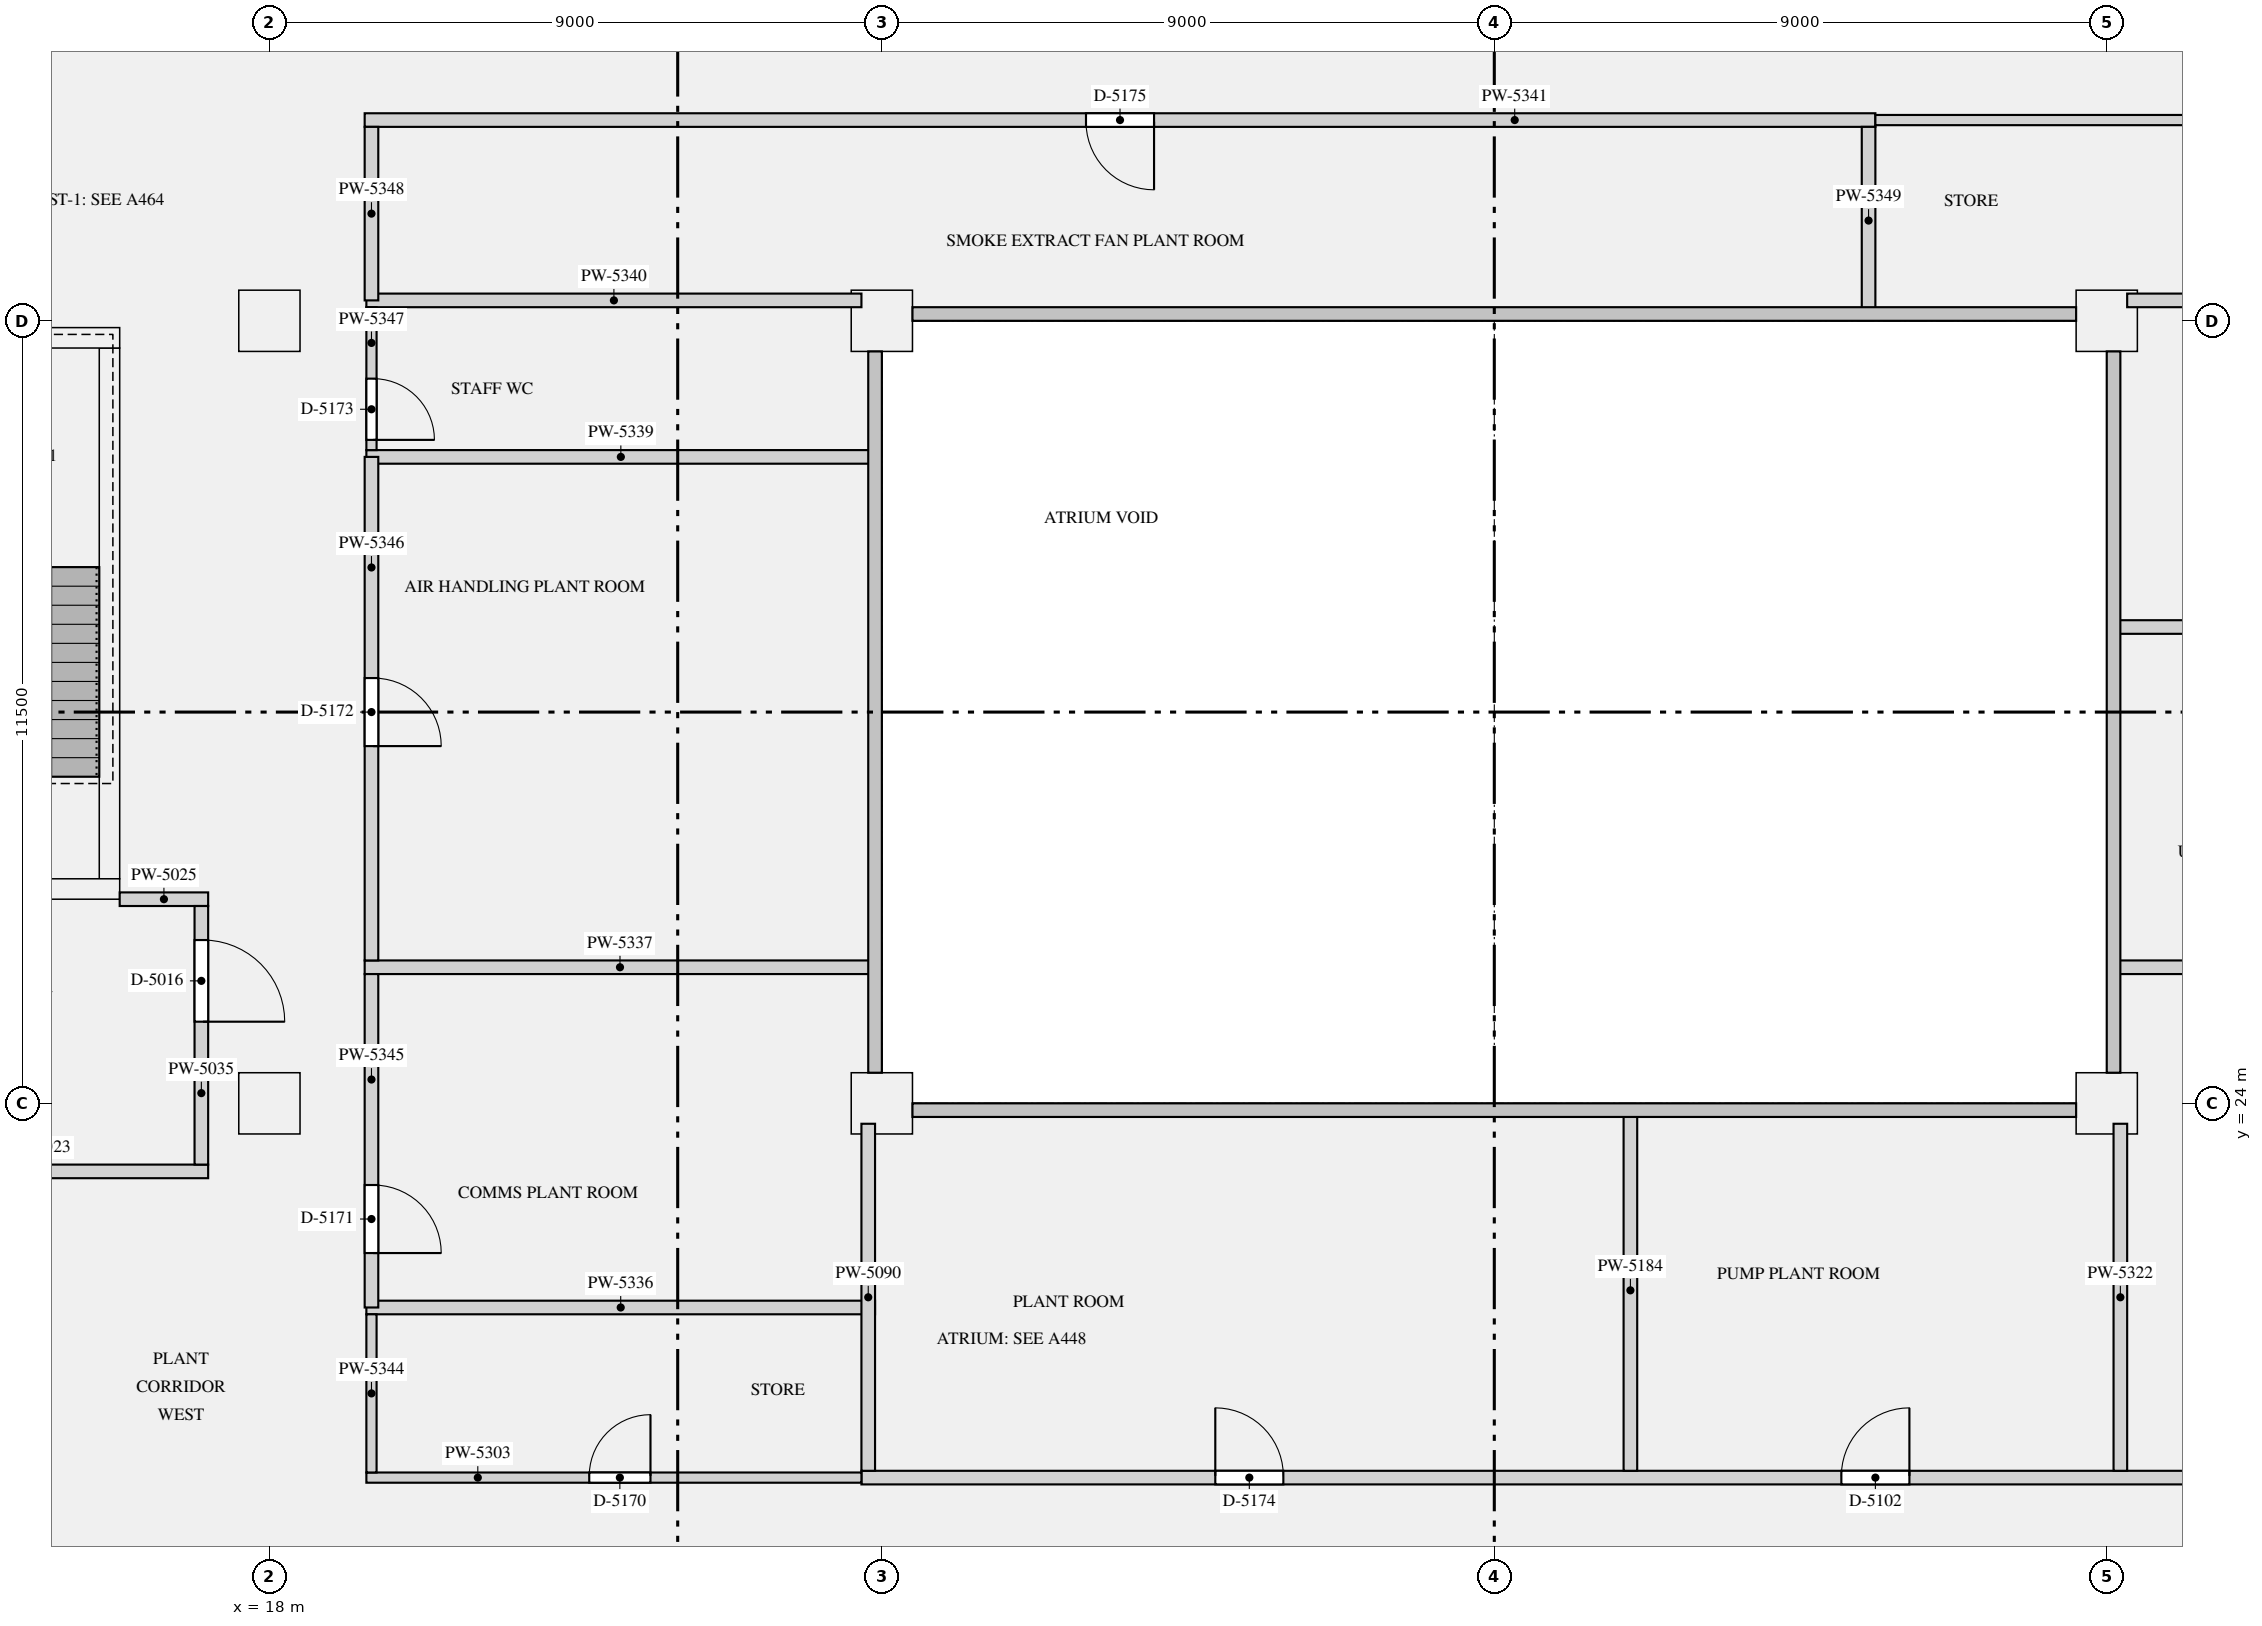
"""IFC4 building model, lengths in metres.
Left out: names, types, materials, properties, quantities, classifications, styles, units other than length and angle.
Written with IfcOpenShell. Run it as: python <this file> out.ifc"""

import sys

from ifc_helpers import new_model, si_unit, direction, frame, frame_2d, origin, origin_2d, place, context, subcontext, project, spatial, rectangle, extrude, element, fill, save


model = new_model("IFC4")
c1 = context("Model", 3, precision=1e-05, world=origin(), true_north=direction((0.0, 1.0)))
c2 = subcontext(c1, "Body", "Model", "MODEL_VIEW")
j1 = project(units=[si_unit("LENGTHUNIT", "METRE"), si_unit("PLANEANGLEUNIT", "RADIAN")], contexts=[c1])
p1 = place(None, origin())
s1 = spatial("IfcSite", under=j1, at=p1, CompositionType="ELEMENT")
p2 = place(p1, origin())
s2 = spatial("IfcBuilding", under=s1, at=p2, CompositionType="ELEMENT")
p3 = place(p2, frame((0.0, 0.0, 240.0)))
s3 = spatial("IfcBuildingStorey", under=s2, at=p3, CompositionType="ELEMENT", Elevation=240.0)
for number, where, z_axis, x_axis in (
    (1, (18.0, 24.0, 0.0), (0.0, 0.0, 1.0), (1.0, 0.0, 0.0)),
    (2, (27.0, 24.0, 0.0), (0.0, 0.0, 1.0), (1.0, 0.0, 0.0)),
    (3, (45.0, 24.0, 0.0), (0.0, 0.0, 1.0), (1.0, 0.0, 0.0)),
    (4, (18.0, 35.5, 0.0), (0.0, 0.0, 1.0), (1.0, 0.0, 0.0)),
    (5, (27.0, 35.5, 0.0), (0.0, 0.0, 1.0), (1.0, 0.0, 0.0)),
    (6, (45.0, 35.5, 0.0), (0.0, 0.0, 1.0), (1.0, 0.0, 0.0)),
):
    element("IfcColumn", number, at=place(p3, frame(where, z_axis=z_axis, x_axis=x_axis)), inside=s3, PredefinedType="COLUMN", context=c2, shape_type="SweptSolid", body=[
        extrude(rectangle(XDim=0.9, YDim=0.9, at=origin_2d()), origin(), (0.0, 0.0, 1.0), 4.2),
    ])
p4 = place(p3, frame((12.2, 27.15, 0.0), z_axis=(0.0, 0.0, 1.0), x_axis=(1.0, 0.0, 0.0)))
e7 = element("IfcWall", 7, at=p4, inside=s3, PredefinedType="SHEAR", context=c2, shape_type="SweptSolid", body=[
    extrude(rectangle(XDim=3.6, YDim=0.3, at=frame_2d((1.8, 0.0))), origin(), (0.0, 0.0, 1.0), 4.2),
])
p5 = place(p4, frame((1.25, 0.0, 0.0)))
e8 = element("IfcOpeningElement", 8, at=p5, cuts=e7, PredefinedType="OPENING", context=c2, shape_type="SweptSolid", body=[
    extrude(rectangle(XDim=1.1, YDim=2.1, at=frame_2d((0.55, 1.05))), frame((0.0, 0.16, 0.0), z_axis=(0.0, -1.0, 0.0), x_axis=(1.0, 0.0, 0.0)), (0.0, 0.0, 1.0), 0.32),
])
p6 = place(p3, frame((12.2, 35.25, 0.0), z_axis=(0.0, 0.0, 1.0), x_axis=(1.0, 0.0, 0.0)))
e9 = element("IfcWall", 9, at=p6, inside=s3, PredefinedType="SHEAR", context=c2, shape_type="SweptSolid", body=[
    extrude(rectangle(XDim=3.6, YDim=0.3, at=frame_2d((1.8, 0.0))), origin(), (0.0, 0.0, 1.0), 4.2),
])
p7 = place(p3, frame((15.65, 27.3, 0.0), z_axis=(0.0, 0.0, 1.0), x_axis=(0.0, 1.0, 0.0)))
e10 = element("IfcWall", 10, at=p7, inside=s3, PredefinedType="SHEAR", context=c2, shape_type="SweptSolid", body=[
    extrude(rectangle(XDim=7.8, YDim=0.3, at=frame_2d((3.9, 0.0))), origin(), (0.0, 0.0, 1.0), 4.2),
])
p8 = place(p3, frame((12.1, 23.0, 0.0), z_axis=(0.0, 0.0, 1.0), x_axis=(1.0, 0.0, 0.0)))
e11 = element("IfcWall", 11, at=p8, inside=s3, PredefinedType="PARTITIONING", context=c2, shape_type="SweptSolid", body=[
    extrude(rectangle(XDim=5.0, YDim=0.2, at=frame_2d((2.5, 0.0))), origin(), (0.0, 0.0, 1.0), 3.85),
])
p9 = place(p3, frame((15.8, 27.0, 0.0), z_axis=(0.0, 0.0, 1.0), x_axis=(1.0, 0.0, 0.0)))
e12 = element("IfcWall", 12, at=p9, inside=s3, PredefinedType="PARTITIONING", context=c2, shape_type="SweptSolid", body=[
    extrude(rectangle(XDim=1.3, YDim=0.2, at=frame_2d((0.65, 0.0))), origin(), (0.0, 0.0, 1.0), 3.85),
])
p10 = place(p3, frame((17.0, 23.1, 0.0), z_axis=(0.0, 0.0, 1.0), x_axis=(0.0, 1.0, 0.0)))
e13 = element("IfcWall", 13, at=p10, inside=s3, PredefinedType="PARTITIONING", context=c2, shape_type="SweptSolid", body=[
    extrude(rectangle(XDim=3.8, YDim=0.2, at=frame_2d((1.9, 0.0))), origin(), (0.0, 0.0, 1.0), 3.85),
])
p11 = place(p10, frame((2.1, 0.0, 0.0)))
e14 = element("IfcOpeningElement", 14, at=p11, cuts=e13, PredefinedType="OPENING", context=c2, shape_type="SweptSolid", body=[
    extrude(rectangle(XDim=1.2, YDim=2.1, at=frame_2d((0.6, 1.05))), frame((0.0, 0.11, 0.0), z_axis=(0.0, -1.0, 0.0), x_axis=(1.0, 0.0, 0.0)), (0.0, 0.0, 1.0), 0.22),
])
p12 = place(p3, frame((26.7, 18.5, 0.0), z_axis=(0.0, 0.0, 1.0), x_axis=(1.0, 0.0, 0.0)))
e15 = element("IfcWall", 15, at=p12, inside=s3, PredefinedType="PARTITIONING", context=c2, shape_type="SweptSolid", body=[
    extrude(rectangle(XDim=25.9, YDim=0.2, at=frame_2d((12.95, 0.0))), origin(), (0.0, 0.0, 1.0), 3.85),
])
p13 = place(p12, frame((5.2, 0.0, 0.0)))
e16 = element("IfcOpeningElement", 16, at=p13, cuts=e15, PredefinedType="OPENING", context=c2, shape_type="SweptSolid", body=[
    extrude(rectangle(XDim=1.0, YDim=2.1, at=frame_2d((0.5, 1.05))), frame((0.0, 0.11, 0.0), z_axis=(0.0, -1.0, 0.0), x_axis=(1.0, 0.0, 0.0)), (0.0, 0.0, 1.0), 0.22),
])
p14 = place(p12, frame((14.4, 0.0, 0.0)))
e17 = element("IfcOpeningElement", 17, at=p14, cuts=e15, PredefinedType="OPENING", context=c2, shape_type="SweptSolid", body=[
    extrude(rectangle(XDim=1.0, YDim=2.1, at=frame_2d((0.5, 1.05))), frame((0.0, 0.11, 0.0), z_axis=(0.0, -1.0, 0.0), x_axis=(1.0, 0.0, 0.0)), (0.0, 0.0, 1.0), 0.22),
])
p15 = place(p3, frame((19.425, 18.5, 0.0), z_axis=(0.0, 0.0, 1.0), x_axis=(1.0, 0.0, 0.0)))
e18 = element("IfcWall", 18, at=p15, inside=s3, PredefinedType="PARTITIONING", context=c2, shape_type="SweptSolid", body=[
    extrude(rectangle(XDim=7.275, YDim=0.15, at=frame_2d((3.637, 0.0))), origin(), (0.0, 0.0, 1.0), 3.85),
])
p16 = place(p15, frame((3.275, 0.0, 0.0)))
e19 = element("IfcOpeningElement", 19, at=p16, cuts=e18, PredefinedType="OPENING", context=c2, shape_type="SweptSolid", body=[
    extrude(rectangle(XDim=0.9, YDim=2.1, at=frame_2d((0.45, 1.05))), frame((0.0, 0.085, 0.0), z_axis=(0.0, -1.0, 0.0), x_axis=(1.0, 0.0, 0.0)), (0.0, 0.0, 1.0), 0.17),
])
p17 = place(p3, frame((19.425, 21.0, 0.0), z_axis=(0.0, 0.0, 1.0), x_axis=(1.0, 0.0, 0.0)))
e20 = element("IfcWall", 20, at=p17, inside=s3, PredefinedType="PARTITIONING", context=c2, shape_type="SweptSolid", body=[
    extrude(rectangle(XDim=7.475, YDim=0.2, at=frame_2d((3.737, 0.0))), origin(), (0.0, 0.0, 1.0), 3.85),
])
for number, where, z_axis, x_axis in (
    (21, (19.4, 26.0, 0.0), (0.0, 0.0, 1.0), (1.0, 0.0, 0.0)),
    (22, (45.096, 26.0, 0.0), (0.0, 0.0, 1.0), (1.0, 0.0, 0.0)),
    (23, (45.096, 31.0, 0.0), (0.0, 0.0, 1.0), (1.0, 0.0, 0.0)),
):
    element("IfcWall", number, at=place(p3, frame(where, z_axis=z_axis, x_axis=x_axis)), inside=s3, PredefinedType="PARTITIONING", context=c2, shape_type="SweptSolid", body=[
        extrude(rectangle(XDim=7.504, YDim=0.2, at=frame_2d((3.752, 0.0))), origin(), (0.0, 0.0, 1.0), 3.85),
    ])
p18 = place(p3, frame((19.425, 33.5, 0.0), z_axis=(0.0, 0.0, 1.0), x_axis=(1.0, 0.0, 0.0)))
e24 = element("IfcWall", 24, at=p18, inside=s3, PredefinedType="PARTITIONING", context=c2, shape_type="SweptSolid", body=[
    extrude(rectangle(XDim=7.479, YDim=0.2, at=frame_2d((3.74, 0.0))), origin(), (0.0, 0.0, 1.0), 3.85),
])
for number, where, z_axis, x_axis in (
    (25, (19.425, 35.8, 0.0), (0.0, 0.0, 1.0), (1.0, 0.0, 0.0)),
    (26, (45.3, 35.8, 0.0), (0.0, 0.0, 1.0), (1.0, 0.0, 0.0)),
):
    element("IfcWall", number, at=place(p3, frame(where, z_axis=z_axis, x_axis=x_axis)), inside=s3, PredefinedType="PARTITIONING", context=c2, shape_type="SweptSolid", body=[
        extrude(rectangle(XDim=7.275, YDim=0.2, at=frame_2d((3.637, 0.0))), origin(), (0.0, 0.0, 1.0), 3.85),
    ])
p19 = place(p3, frame((19.4, 38.45, 0.0), z_axis=(0.0, 0.0, 1.0), x_axis=(1.0, 0.0, 0.0)))
e27 = element("IfcWall", 27, at=p19, inside=s3, PredefinedType="PARTITIONING", context=c2, shape_type="SweptSolid", body=[
    extrude(rectangle(XDim=22.2, YDim=0.2, at=frame_2d((11.1, 0.0))), origin(), (0.0, 0.0, 1.0), 3.85),
])
p20 = place(p19, frame((10.6, 0.0, 0.0)))
e28 = element("IfcOpeningElement", 28, at=p20, cuts=e27, PredefinedType="OPENING", context=c2, shape_type="SweptSolid", body=[
    extrude(rectangle(XDim=1.0, YDim=2.1, at=frame_2d((0.5, 1.05))), frame((0.0, 0.11, 0.0), z_axis=(0.0, -1.0, 0.0), x_axis=(1.0, 0.0, 0.0)), (0.0, 0.0, 1.0), 0.22),
])
p21 = place(p3, frame((41.6, 38.45, 0.0), z_axis=(0.0, 0.0, 1.0), x_axis=(1.0, 0.0, 0.0)))
e29 = element("IfcWall", 29, at=p21, inside=s3, PredefinedType="PARTITIONING", context=c2, shape_type="SweptSolid", body=[
    extrude(rectangle(XDim=10.975, YDim=0.15, at=frame_2d((5.487, 0.0))), origin(), (0.0, 0.0, 1.0), 3.85),
])
p22 = place(p21, frame((4.95, 0.0, 0.0)))
e30 = element("IfcOpeningElement", 30, at=p22, cuts=e29, PredefinedType="OPENING", context=c2, shape_type="SweptSolid", body=[
    extrude(rectangle(XDim=0.9, YDim=2.1, at=frame_2d((0.45, 1.05))), frame((0.0, 0.085, 0.0), z_axis=(0.0, -1.0, 0.0), x_axis=(1.0, 0.0, 0.0)), (0.0, 0.0, 1.0), 0.17),
])
p23 = place(p3, frame((19.5, 18.575, 0.0), z_axis=(0.0, 0.0, 1.0), x_axis=(0.0, 1.0, 0.0)))
e31 = element("IfcWall", 31, at=p23, inside=s3, PredefinedType="PARTITIONING", context=c2, shape_type="SweptSolid", body=[
    extrude(rectangle(XDim=2.325, YDim=0.15, at=frame_2d((1.163, 0.0))), origin(), (0.0, 0.0, 1.0), 3.85),
])
p24 = place(p3, frame((26.8, 18.6, 0.0), z_axis=(0.0, 0.0, 1.0), x_axis=(0.0, 1.0, 0.0)))
e32 = element("IfcWall", 32, at=p24, inside=s3, PredefinedType="PARTITIONING", context=c2, shape_type="SweptSolid", body=[
    extrude(rectangle(XDim=5.1, YDim=0.2, at=frame_2d((2.55, 0.0))), origin(), (0.0, 0.0, 1.0), 3.85),
])
p25 = place(p3, frame((38.0, 18.6, 0.0), z_axis=(0.0, 0.0, 1.0), x_axis=(0.0, 1.0, 0.0)))
e33 = element("IfcWall", 33, at=p25, inside=s3, PredefinedType="PARTITIONING", context=c2, shape_type="SweptSolid", body=[
    extrude(rectangle(XDim=5.304, YDim=0.2, at=frame_2d((2.652, 0.0))), origin(), (0.0, 0.0, 1.0), 3.85),
])
p26 = place(p3, frame((45.2, 18.6, 0.0), z_axis=(0.0, 0.0, 1.0), x_axis=(0.0, 1.0, 0.0)))
e34 = element("IfcWall", 34, at=p26, inside=s3, PredefinedType="PARTITIONING", context=c2, shape_type="SweptSolid", body=[
    extrude(rectangle(XDim=5.1, YDim=0.2, at=frame_2d((2.55, 0.0))), origin(), (0.0, 0.0, 1.0), 3.85),
])
p27 = place(p3, frame((19.5, 21.0, 0.0), z_axis=(0.0, 0.0, 1.0), x_axis=(0.0, 1.0, 0.0)))
e35 = element("IfcWall", 35, at=p27, inside=s3, PredefinedType="PARTITIONING", context=c2, shape_type="SweptSolid", body=[
    extrude(rectangle(XDim=4.9, YDim=0.2, at=frame_2d((2.45, 0.0))), origin(), (0.0, 0.0, 1.0), 3.85),
])
p28 = place(p27, frame((0.8, 0.0, 0.0)))
e36 = element("IfcOpeningElement", 36, at=p28, cuts=e35, PredefinedType="OPENING", context=c2, shape_type="SweptSolid", body=[
    extrude(rectangle(XDim=1.0, YDim=2.1, at=frame_2d((0.5, 1.05))), frame((0.0, 0.11, 0.0), z_axis=(0.0, -1.0, 0.0), x_axis=(1.0, 0.0, 0.0)), (0.0, 0.0, 1.0), 0.22),
])
p29 = place(p3, frame((19.5, 26.1, 0.0), z_axis=(0.0, 0.0, 1.0), x_axis=(0.0, 1.0, 0.0)))
e37 = element("IfcWall", 37, at=p29, inside=s3, PredefinedType="PARTITIONING", context=c2, shape_type="SweptSolid", body=[
    extrude(rectangle(XDim=7.4, YDim=0.2, at=frame_2d((3.7, 0.0))), origin(), (0.0, 0.0, 1.0), 3.85),
])
p30 = place(p29, frame((3.15, 0.0, 0.0)))
e38 = element("IfcOpeningElement", 38, at=p30, cuts=e37, PredefinedType="OPENING", context=c2, shape_type="SweptSolid", body=[
    extrude(rectangle(XDim=1.0, YDim=2.1, at=frame_2d((0.5, 1.05))), frame((0.0, 0.11, 0.0), z_axis=(0.0, -1.0, 0.0), x_axis=(1.0, 0.0, 0.0)), (0.0, 0.0, 1.0), 0.22),
])
p31 = place(p3, frame((19.5, 33.6, 0.0), z_axis=(0.0, 0.0, 1.0), x_axis=(0.0, 1.0, 0.0)))
e39 = element("IfcWall", 39, at=p31, inside=s3, PredefinedType="PARTITIONING", context=c2, shape_type="SweptSolid", body=[
    extrude(rectangle(XDim=2.1, YDim=0.15, at=frame_2d((1.05, 0.0))), origin(), (0.0, 0.0, 1.0), 3.85),
])
p32 = place(p31, frame((0.15, 0.0, 0.0)))
e40 = element("IfcOpeningElement", 40, at=p32, cuts=e39, PredefinedType="OPENING", context=c2, shape_type="SweptSolid", body=[
    extrude(rectangle(XDim=0.9, YDim=2.1, at=frame_2d((0.45, 1.05))), frame((0.0, 0.085, 0.0), z_axis=(0.0, -1.0, 0.0), x_axis=(1.0, 0.0, 0.0)), (0.0, 0.0, 1.0), 0.17),
])
p33 = place(p3, frame((19.5, 35.8, 0.0), z_axis=(0.0, 0.0, 1.0), x_axis=(0.0, 1.0, 0.0)))
e41 = element("IfcWall", 41, at=p33, inside=s3, PredefinedType="PARTITIONING", context=c2, shape_type="SweptSolid", body=[
    extrude(rectangle(XDim=2.55, YDim=0.2, at=frame_2d((1.275, 0.0))), origin(), (0.0, 0.0, 1.0), 3.85),
])
p34 = place(p3, frame((41.5, 35.596, 0.0), z_axis=(0.0, 0.0, 1.0), x_axis=(0.0, 1.0, 0.0)))
e42 = element("IfcWall", 42, at=p34, inside=s3, PredefinedType="PARTITIONING", context=c2, shape_type="SweptSolid", body=[
    extrude(rectangle(XDim=2.754, YDim=0.2, at=frame_2d((1.377, 0.0))), origin(), (0.0, 0.0, 1.0), 3.85),
])
p35 = place(p11, frame((1.2, 0.0, 0.0), z_axis=(0.0, 0.0, 1.0), x_axis=(-1.0, 0.0, 0.0)))
e43 = element("IfcDoor", 43, at=p35, inside=s3, OperationType="SINGLE_SWING_RIGHT", PredefinedType="DOOR", context=c2, shape_type="SweptSolid", body=[
    extrude(rectangle(XDim=1.2, YDim=2.1, at=frame_2d((0.6, 1.05))), frame((0.0, 0.025, 0.0), z_axis=(0.0, -1.0, 0.0), x_axis=(1.0, 0.0, 0.0)), (0.0, 0.0, 1.0), 0.05),
])
fill(e14, e43)
p36 = place(p16, origin())
e44 = element("IfcDoor", 44, at=p36, inside=s3, OperationType="SINGLE_SWING_RIGHT", PredefinedType="DOOR", context=c2, shape_type="SweptSolid", body=[
    extrude(rectangle(XDim=0.9, YDim=2.1, at=frame_2d((0.45, 1.05))), frame((0.0, 0.025, 0.0), z_axis=(0.0, -1.0, 0.0), x_axis=(1.0, 0.0, 0.0)), (0.0, 0.0, 1.0), 0.05),
])
fill(e19, e44)
p37 = place(p28, frame((1.0, 0.0, 0.0), z_axis=(0.0, 0.0, 1.0), x_axis=(-1.0, 0.0, 0.0)))
e45 = element("IfcDoor", 45, at=p37, inside=s3, OperationType="SINGLE_SWING_RIGHT", PredefinedType="DOOR", context=c2, shape_type="SweptSolid", body=[
    extrude(rectangle(XDim=1.0, YDim=2.1, at=frame_2d((0.5, 1.05))), frame((0.0, 0.025, 0.0), z_axis=(0.0, -1.0, 0.0), x_axis=(1.0, 0.0, 0.0)), (0.0, 0.0, 1.0), 0.05),
])
fill(e36, e45)
p38 = place(p30, frame((1.0, 0.0, 0.0), z_axis=(0.0, 0.0, 1.0), x_axis=(-1.0, 0.0, 0.0)))
e46 = element("IfcDoor", 46, at=p38, inside=s3, OperationType="SINGLE_SWING_RIGHT", PredefinedType="DOOR", context=c2, shape_type="SweptSolid", body=[
    extrude(rectangle(XDim=1.0, YDim=2.1, at=frame_2d((0.5, 1.05))), frame((0.0, 0.025, 0.0), z_axis=(0.0, -1.0, 0.0), x_axis=(1.0, 0.0, 0.0)), (0.0, 0.0, 1.0), 0.05),
])
fill(e38, e46)
p39 = place(p32, frame((0.9, 0.0, 0.0), z_axis=(0.0, 0.0, 1.0), x_axis=(-1.0, 0.0, 0.0)))
e47 = element("IfcDoor", 47, at=p39, inside=s3, OperationType="SINGLE_SWING_RIGHT", PredefinedType="DOOR", context=c2, shape_type="SweptSolid", body=[
    extrude(rectangle(XDim=0.9, YDim=2.1, at=frame_2d((0.45, 1.05))), frame((0.0, 0.025, 0.0), z_axis=(0.0, -1.0, 0.0), x_axis=(1.0, 0.0, 0.0)), (0.0, 0.0, 1.0), 0.05),
])
fill(e40, e47)
p40 = place(p13, origin())
e48 = element("IfcDoor", 48, at=p40, inside=s3, OperationType="SINGLE_SWING_LEFT", PredefinedType="DOOR", context=c2, shape_type="SweptSolid", body=[
    extrude(rectangle(XDim=1.0, YDim=2.1, at=frame_2d((0.5, 1.05))), frame((0.0, 0.025, 0.0), z_axis=(0.0, -1.0, 0.0), x_axis=(1.0, 0.0, 0.0)), (0.0, 0.0, 1.0), 0.05),
])
fill(e16, e48)
p41 = place(p14, origin())
e49 = element("IfcDoor", 49, at=p41, inside=s3, OperationType="SINGLE_SWING_RIGHT", PredefinedType="DOOR", context=c2, shape_type="SweptSolid", body=[
    extrude(rectangle(XDim=1.0, YDim=2.1, at=frame_2d((0.5, 1.05))), frame((0.0, 0.025, 0.0), z_axis=(0.0, -1.0, 0.0), x_axis=(1.0, 0.0, 0.0)), (0.0, 0.0, 1.0), 0.05),
])
fill(e17, e49)
p42 = place(p20, frame((1.0, 0.0, 0.0), z_axis=(0.0, 0.0, 1.0), x_axis=(-1.0, 0.0, 0.0)))
e50 = element("IfcDoor", 50, at=p42, inside=s3, OperationType="SINGLE_SWING_LEFT", PredefinedType="DOOR", context=c2, shape_type="SweptSolid", body=[
    extrude(rectangle(XDim=1.0, YDim=2.1, at=frame_2d((0.5, 1.05))), frame((0.0, 0.025, 0.0), z_axis=(0.0, -1.0, 0.0), x_axis=(1.0, 0.0, 0.0)), (0.0, 0.0, 1.0), 0.05),
])
fill(e28, e50)
save(model, sys.argv[1])
